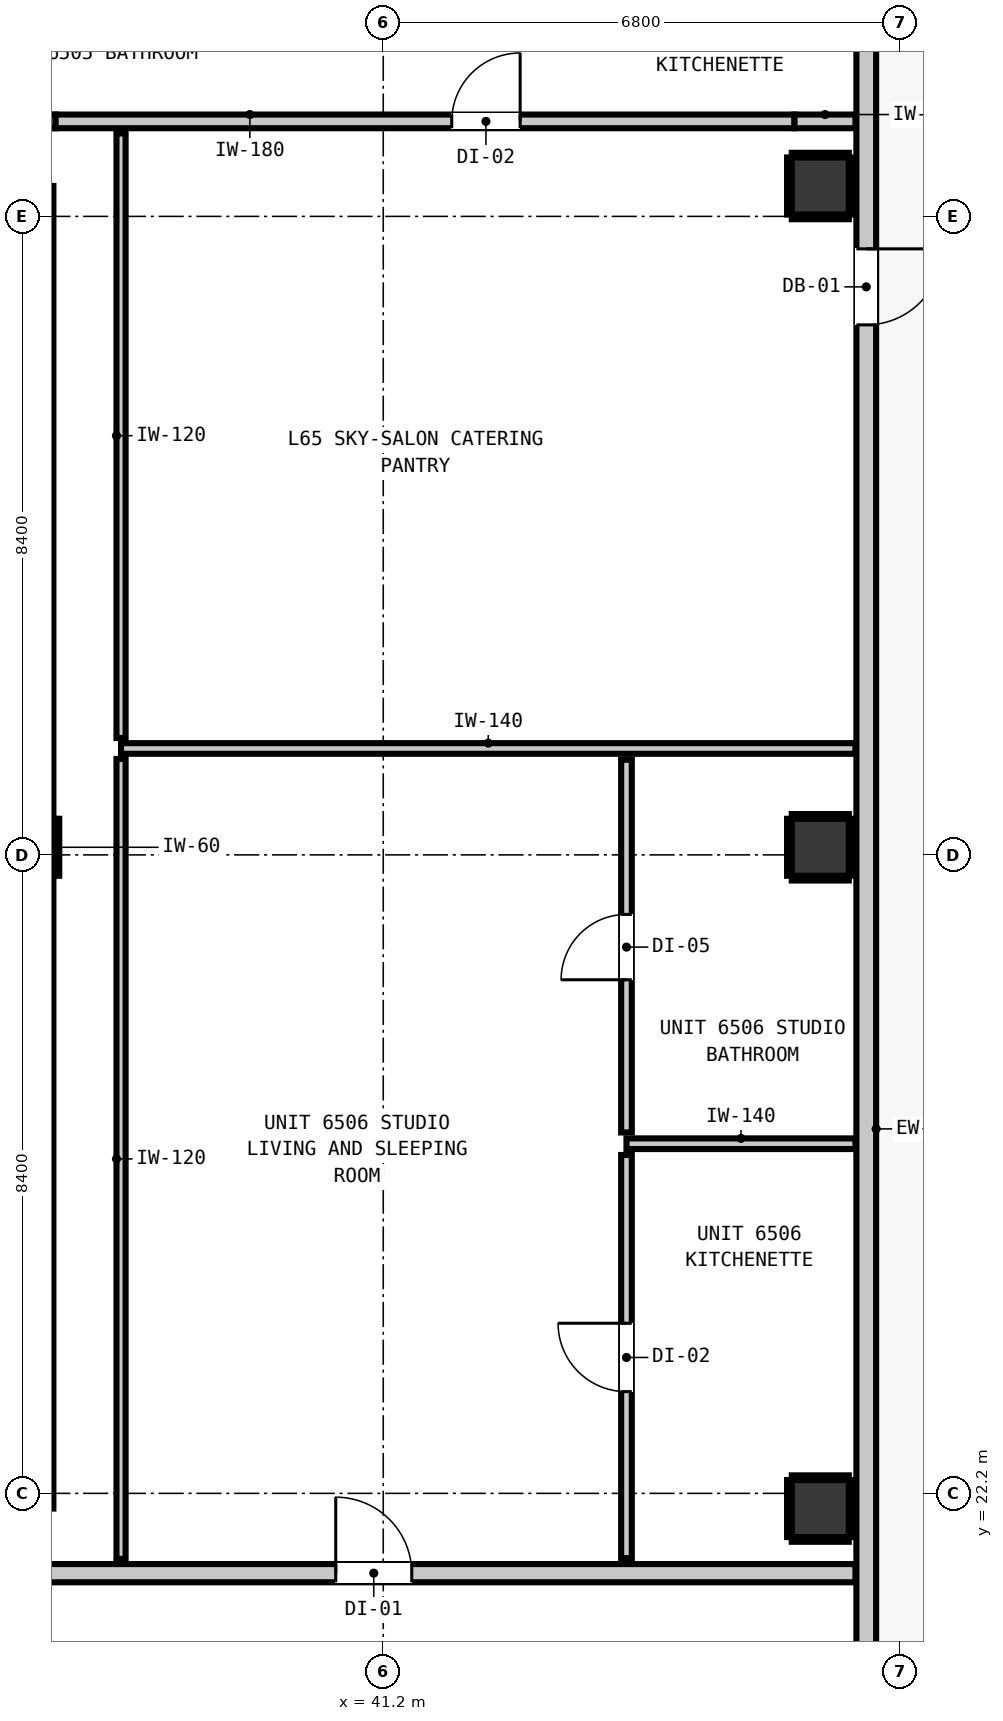
"""IFC4 building model, lengths in metres.
Left out: names, types, materials, properties, quantities, classifications, styles, units other than length and angle.
Written with IfcOpenShell. Run it as: python <this file> out.ifc"""

import sys

from ifc_helpers import new_model, si_unit, direction, frame, frame_2d, origin, origin_2d, place, context, subcontext, project, spatial, rectangle, extrude, element, fill, save


model = new_model("IFC4")
c1 = context("Model", 3, precision=1e-05, world=origin(), true_north=direction((0.0, 1.0)))
c2 = subcontext(c1, "Body", "Model", "MODEL_VIEW")
j1 = project(units=[si_unit("LENGTHUNIT", "METRE"), si_unit("PLANEANGLEUNIT", "RADIAN")], contexts=[c1])
p1 = place(None, origin())
s1 = spatial("IfcSite", under=j1, at=p1, CompositionType="ELEMENT")
p2 = place(p1, origin())
s2 = spatial("IfcBuilding", under=s1, at=p2, CompositionType="ELEMENT")
p3 = place(p2, frame((0.0, 0.0, 223.36)))
s3 = spatial("IfcBuildingStorey", under=s2, at=p3, CompositionType="ELEMENT", Elevation=223.36)
p4 = place(p3, frame((36.5, 30.7, 0.0), z_axis=(0.0, 0.0, 1.0), x_axis=(1.0, 0.0, 0.0)))
e1 = element("IfcColumn", 1, at=p4, inside=s3, PredefinedType="COLUMN", context=c2, shape_type="SweptSolid", body=[
    extrude(rectangle(XDim=0.75, YDim=0.75, at=origin_2d()), origin(), (0.0, 0.0, 1.0), 3.32),
])
p5 = place(p3, frame((36.46, 22.0, 0.0), z_axis=(0.0, 0.0, 1.0), x_axis=(0.0, 1.0, 0.0)))
e2 = element("IfcWall", 2, at=p5, inside=s3, PredefinedType="SHEAR", context=c2, shape_type="SweptSolid", body=[
    extrude(rectangle(XDim=8.32, YDim=0.8, at=frame_2d((4.16, 0.0))), origin(), (0.0, 0.0, 1.0), 3.32),
])
p6 = place(p3, frame((36.46, 31.08, 0.0), z_axis=(0.0, 0.0, 1.0), x_axis=(0.0, 1.0, 0.0)))
e3 = element("IfcWall", 3, at=p6, inside=s3, PredefinedType="SHEAR", context=c2, shape_type="SweptSolid", body=[
    extrude(rectangle(XDim=8.32, YDim=0.8, at=frame_2d((4.16, 0.0))), origin(), (0.0, 0.0, 1.0), 3.32),
])
for number, where, z_axis, x_axis in (
    (4, (46.95, 22.0, 0.0), (0.0, 0.0, 1.0), (1.0, 0.0, 0.0)),
    (5, (46.95, 30.7, 0.0), (0.0, 0.0, 1.0), (1.0, 0.0, 0.0)),
    (6, (46.95, 39.4, 0.0), (0.0, 0.0, 1.0), (1.0, 0.0, 0.0)),
):
    element("IfcColumn", number, at=place(p3, frame(where, z_axis=z_axis, x_axis=x_axis)), inside=s3, PredefinedType="COLUMN", context=c2, shape_type="SweptSolid", body=[
        extrude(rectangle(XDim=0.75, YDim=0.75, at=origin_2d()), origin(), (0.0, 0.0, 1.0), 3.32),
    ])
p7 = place(p3, frame((47.555, 42.655, 0.0), z_axis=(0.0, 0.0, 1.0), x_axis=(0.0, -1.0, 0.0)))
e7 = element("IfcWall", 7, at=p7, inside=s3, PredefinedType="STANDARD", context=c2, shape_type="SweptSolid", body=[
    extrude(rectangle(XDim=30.31, YDim=0.26, at=frame_2d((15.155, 0.0))), origin(), (0.0, 0.0, 1.0), 2.92),
])
p8 = place(p7, frame((4.082, 0.0, 0.0)))
e8 = element("IfcOpeningElement", 8, at=p8, cuts=e7, PredefinedType="OPENING", context=c2, shape_type="SweptSolid", body=[
    extrude(rectangle(XDim=1.0, YDim=2.15, at=frame_2d((0.5, 1.075))), frame((0.0, 0.14, 0.0), z_axis=(0.0, -1.0, 0.0), x_axis=(1.0, 0.0, 0.0)), (0.0, 0.0, 1.0), 0.28),
])
p9 = place(p7, frame((26.238, 0.0, 0.85)))
e9 = element("IfcOpeningElement", 9, at=p9, cuts=e7, PredefinedType="OPENING", context=c2, shape_type="SweptSolid", body=[
    extrude(rectangle(XDim=1.05, YDim=1.65, at=frame_2d((0.525, 0.825))), frame((0.0, 0.14, 0.0), z_axis=(0.0, -1.0, 0.0), x_axis=(1.0, 0.0, 0.0)), (0.0, 0.0, 1.0), 0.28),
])
p10 = place(p3, frame((10.787, 21.15, 0.0), z_axis=(0.0, 0.0, 1.0), x_axis=(1.0, 0.0, 0.0)))
e10 = element("IfcWall", 10, at=p10, inside=s3, PredefinedType="PARTITIONING", context=c2, shape_type="SweptSolid", body=[
    extrude(rectangle(XDim=36.626, YDim=0.24, at=frame_2d((18.313, 0.0))), origin(), (0.0, 0.0, 1.0), 2.92),
])
p11 = place(p10, frame((7.423, 0.0, 0.0)))
e11 = element("IfcOpeningElement", 11, at=p11, cuts=e10, PredefinedType="OPENING", context=c2, shape_type="SweptSolid", body=[
    extrude(rectangle(XDim=1.1, YDim=2.15, at=frame_2d((0.55, 1.075))), frame((0.0, 0.13, 0.0), z_axis=(0.0, -1.0, 0.0), x_axis=(1.0, 0.0, 0.0)), (0.0, 0.0, 1.0), 0.26),
])
p12 = place(p10, frame((29.788, 0.0, 0.0)))
e12 = element("IfcOpeningElement", 12, at=p12, cuts=e10, PredefinedType="OPENING", context=c2, shape_type="SweptSolid", body=[
    extrude(rectangle(XDim=1.0, YDim=2.15, at=frame_2d((0.5, 1.075))), frame((0.0, 0.13, 0.0), z_axis=(0.0, -1.0, 0.0), x_axis=(1.0, 0.0, 0.0)), (0.0, 0.0, 1.0), 0.26),
])
p13 = place(p3, frame((10.787, 40.25, 0.0), z_axis=(0.0, 0.0, 1.0), x_axis=(1.0, 0.0, 0.0)))
e13 = element("IfcWall", 13, at=p13, inside=s3, PredefinedType="PARTITIONING", context=c2, shape_type="SweptSolid", body=[
    extrude(rectangle(XDim=26.102, YDim=0.18, at=frame_2d((13.051, 0.0))), origin(), (0.0, 0.0, 1.0), 2.92),
])
p14 = place(p13, frame((6.648, 0.0, 0.0)))
e14 = element("IfcOpeningElement", 14, at=p14, cuts=e13, PredefinedType="OPENING", context=c2, shape_type="SweptSolid", body=[
    extrude(rectangle(XDim=1.4, YDim=2.15, at=frame_2d((0.7, 1.075))), frame((0.0, 0.1, 0.0), z_axis=(0.0, -1.0, 0.0), x_axis=(1.0, 0.0, 0.0)), (0.0, 0.0, 1.0), 0.2),
])
p15 = place(p3, frame((36.889, 40.25, 0.0), z_axis=(0.0, 0.0, 1.0), x_axis=(1.0, 0.0, 0.0)))
e15 = element("IfcWall", 15, at=p15, inside=s3, PredefinedType="PARTITIONING", context=c2, shape_type="SweptSolid", body=[
    extrude(rectangle(XDim=9.722, YDim=0.18, at=frame_2d((4.861, 0.0))), origin(), (0.0, 0.0, 1.0), 2.297),
])
p16 = place(p15, frame((5.212, 0.0, 0.0)))
e16 = element("IfcOpeningElement", 16, at=p16, cuts=e15, PredefinedType="OPENING", context=c2, shape_type="SweptSolid", body=[
    extrude(rectangle(XDim=0.9, YDim=2.1, at=frame_2d((0.45, 1.05))), frame((0.0, 0.1, 0.0), z_axis=(0.0, -1.0, 0.0), x_axis=(1.0, 0.0, 0.0)), (0.0, 0.0, 1.0), 0.2),
])
p17 = place(p3, frame((46.611, 40.25, 0.0), z_axis=(0.0, 0.0, 1.0), x_axis=(1.0, 0.0, 0.0)))
e17 = element("IfcWall", 17, at=p17, inside=s3, PredefinedType="PARTITIONING", context=c2, shape_type="SweptSolid", body=[
    extrude(rectangle(XDim=0.802, YDim=0.18, at=frame_2d((0.401, 0.0))), origin(), (0.0, 0.0, 1.0), 2.92),
])
p18 = place(p3, frame((44.4, 26.8, 0.0), z_axis=(0.0, 0.0, 1.0), x_axis=(1.0, 0.0, 0.0)))
e18 = element("IfcWall", 18, at=p18, inside=s3, PredefinedType="PARTITIONING", context=c2, shape_type="SweptSolid", body=[
    extrude(rectangle(XDim=3.013, YDim=0.14, at=frame_2d((1.507, 0.0))), origin(), (0.0, 0.0, 1.0), 2.92),
])
p19 = place(p3, frame((37.75, 32.0, 0.0), z_axis=(0.0, 0.0, 1.0), x_axis=(1.0, 0.0, 0.0)))
e19 = element("IfcWall", 19, at=p19, inside=s3, PredefinedType="PARTITIONING", context=c2, shape_type="SweptSolid", body=[
    extrude(rectangle(XDim=9.663, YDim=0.14, at=frame_2d((4.832, 0.0))), origin(), (0.0, 0.0, 1.0), 2.92),
])
p20 = place(p3, frame((44.4, 21.348, 0.0), z_axis=(0.0, 0.0, 1.0), x_axis=(0.0, 1.0, 0.0)))
e20 = element("IfcWall", 20, at=p20, inside=s3, PredefinedType="PARTITIONING", context=c2, shape_type="SweptSolid", body=[
    extrude(rectangle(XDim=5.304, YDim=0.14, at=frame_2d((2.652, 0.0))), origin(), (0.0, 0.0, 1.0), 2.92),
])
p21 = place(p20, frame((2.19, 0.0, 0.0)))
e21 = element("IfcOpeningElement", 21, at=p21, cuts=e20, PredefinedType="OPENING", context=c2, shape_type="SweptSolid", body=[
    extrude(rectangle(XDim=0.9, YDim=2.1, at=frame_2d((0.45, 1.05))), frame((0.0, 0.08, 0.0), z_axis=(0.0, -1.0, 0.0), x_axis=(1.0, 0.0, 0.0)), (0.0, 0.0, 1.0), 0.16),
])
p22 = place(p3, frame((44.4, 26.948, 0.0), z_axis=(0.0, 0.0, 1.0), x_axis=(0.0, 1.0, 0.0)))
e22 = element("IfcWall", 22, at=p22, inside=s3, PredefinedType="PARTITIONING", context=c2, shape_type="SweptSolid", body=[
    extrude(rectangle(XDim=4.904, YDim=0.14, at=frame_2d((2.452, 0.0))), origin(), (0.0, 0.0, 1.0), 2.92),
])
p23 = place(p22, frame((2.009, 0.0, 0.0)))
e23 = element("IfcOpeningElement", 23, at=p23, cuts=e22, PredefinedType="OPENING", context=c2, shape_type="SweptSolid", body=[
    extrude(rectangle(XDim=0.86, YDim=2.02, at=frame_2d((0.43, 1.01))), frame((0.0, 0.08, 0.0), z_axis=(0.0, -1.0, 0.0), x_axis=(1.0, 0.0, 0.0)), (0.0, 0.0, 1.0), 0.16),
])
p24 = place(p3, frame((37.75, 21.338, 0.0), z_axis=(0.0, 0.0, 1.0), x_axis=(0.0, 1.0, 0.0)))
e24 = element("IfcWall", 24, at=p24, inside=s3, PredefinedType="PARTITIONING", context=c2, shape_type="SweptSolid", body=[
    extrude(rectangle(XDim=10.524, YDim=0.12, at=frame_2d((5.262, 0.0))), origin(), (0.0, 0.0, 1.0), 2.92),
])
p25 = place(p3, frame((37.75, 32.138, 0.0), z_axis=(0.0, 0.0, 1.0), x_axis=(0.0, 1.0, 0.0)))
e25 = element("IfcWall", 25, at=p25, inside=s3, PredefinedType="PARTITIONING", context=c2, shape_type="SweptSolid", body=[
    extrude(rectangle(XDim=7.954, YDim=0.12, at=frame_2d((3.977, 0.0))), origin(), (0.0, 0.0, 1.0), 2.92),
])
for number, where, z_axis, x_axis in (
    (26, (36.907, 30.325, 0.0), (0.0, 0.0, 1.0), (0.0, 1.0, 0.0)),
    (27, (46.575, 21.593, 0.0), (0.0, 0.0, 1.0), (1.0, 0.0, 0.0)),
    (28, (46.575, 22.407, 0.0), (0.0, 0.0, 1.0), (1.0, 0.0, 0.0)),
    (29, (46.543, 21.625, 0.0), (0.0, 0.0, 1.0), (0.0, 1.0, 0.0)),
    (30, (47.357, 21.625, 0.0), (0.0, 0.0, 1.0), (0.0, 1.0, 0.0)),
    (31, (46.575, 30.293, 0.0), (0.0, 0.0, 1.0), (1.0, 0.0, 0.0)),
    (32, (46.575, 31.107, 0.0), (0.0, 0.0, 1.0), (1.0, 0.0, 0.0)),
    (33, (46.543, 30.325, 0.0), (0.0, 0.0, 1.0), (0.0, 1.0, 0.0)),
    (34, (47.357, 30.325, 0.0), (0.0, 0.0, 1.0), (0.0, 1.0, 0.0)),
    (35, (46.575, 38.993, 0.0), (0.0, 0.0, 1.0), (1.0, 0.0, 0.0)),
    (36, (46.575, 39.807, 0.0), (0.0, 0.0, 1.0), (1.0, 0.0, 0.0)),
    (37, (46.543, 39.025, 0.0), (0.0, 0.0, 1.0), (0.0, 1.0, 0.0)),
    (38, (47.357, 39.025, 0.0), (0.0, 0.0, 1.0), (0.0, 1.0, 0.0)),
):
    element("IfcWall", number, at=place(p3, frame(where, z_axis=z_axis, x_axis=x_axis)), inside=s3, PredefinedType="PARTITIONING", context=c2, shape_type="SweptSolid", body=[
        extrude(rectangle(XDim=0.75, YDim=0.06, at=frame_2d((0.375, 0.0))), origin(), (0.0, 0.0, 1.0), 1.45),
    ])
p26 = place(p8, origin())
e39 = element("IfcDoor", 39, at=p26, inside=s3, OperationType="SINGLE_SWING_LEFT", PredefinedType="DOOR", context=c2, shape_type="SweptSolid", body=[
    extrude(rectangle(XDim=1.0, YDim=2.15, at=frame_2d((0.5, 1.075))), frame((0.0, 0.025, 0.0), z_axis=(0.0, -1.0, 0.0), x_axis=(1.0, 0.0, 0.0)), (0.0, 0.0, 1.0), 0.05),
])
fill(e8, e39)
p27 = place(p12, origin())
e40 = element("IfcDoor", 40, at=p27, inside=s3, OperationType="SINGLE_SWING_LEFT", PredefinedType="DOOR", context=c2, shape_type="SweptSolid", body=[
    extrude(rectangle(XDim=1.0, YDim=2.15, at=frame_2d((0.5, 1.075))), frame((0.0, 0.025, 0.0), z_axis=(0.0, -1.0, 0.0), x_axis=(1.0, 0.0, 0.0)), (0.0, 0.0, 1.0), 0.05),
])
fill(e12, e40)
p28 = place(p21, origin())
e41 = element("IfcDoor", 41, at=p28, inside=s3, OperationType="SINGLE_SWING_RIGHT", PredefinedType="DOOR", context=c2, shape_type="SweptSolid", body=[
    extrude(rectangle(XDim=0.9, YDim=2.1, at=frame_2d((0.45, 1.05))), frame((0.0, 0.025, 0.0), z_axis=(0.0, -1.0, 0.0), x_axis=(1.0, 0.0, 0.0)), (0.0, 0.0, 1.0), 0.05),
])
fill(e21, e41)
p29 = place(p23, origin())
e42 = element("IfcDoor", 42, at=p29, inside=s3, OperationType="SINGLE_SWING_LEFT", PredefinedType="DOOR", context=c2, shape_type="SweptSolid", body=[
    extrude(rectangle(XDim=0.86, YDim=2.02, at=frame_2d((0.43, 1.01))), frame((0.0, 0.025, 0.0), z_axis=(0.0, -1.0, 0.0), x_axis=(1.0, 0.0, 0.0)), (0.0, 0.0, 1.0), 0.05),
])
fill(e23, e42)
p30 = place(p16, origin())
e43 = element("IfcDoor", 43, at=p30, inside=s3, OperationType="SINGLE_SWING_RIGHT", PredefinedType="DOOR", context=c2, shape_type="SweptSolid", body=[
    extrude(rectangle(XDim=0.9, YDim=2.1, at=frame_2d((0.45, 1.05))), frame((0.0, 0.025, 0.0), z_axis=(0.0, -1.0, 0.0), x_axis=(1.0, 0.0, 0.0)), (0.0, 0.0, 1.0), 0.05),
])
fill(e16, e43)
save(model, sys.argv[1])
